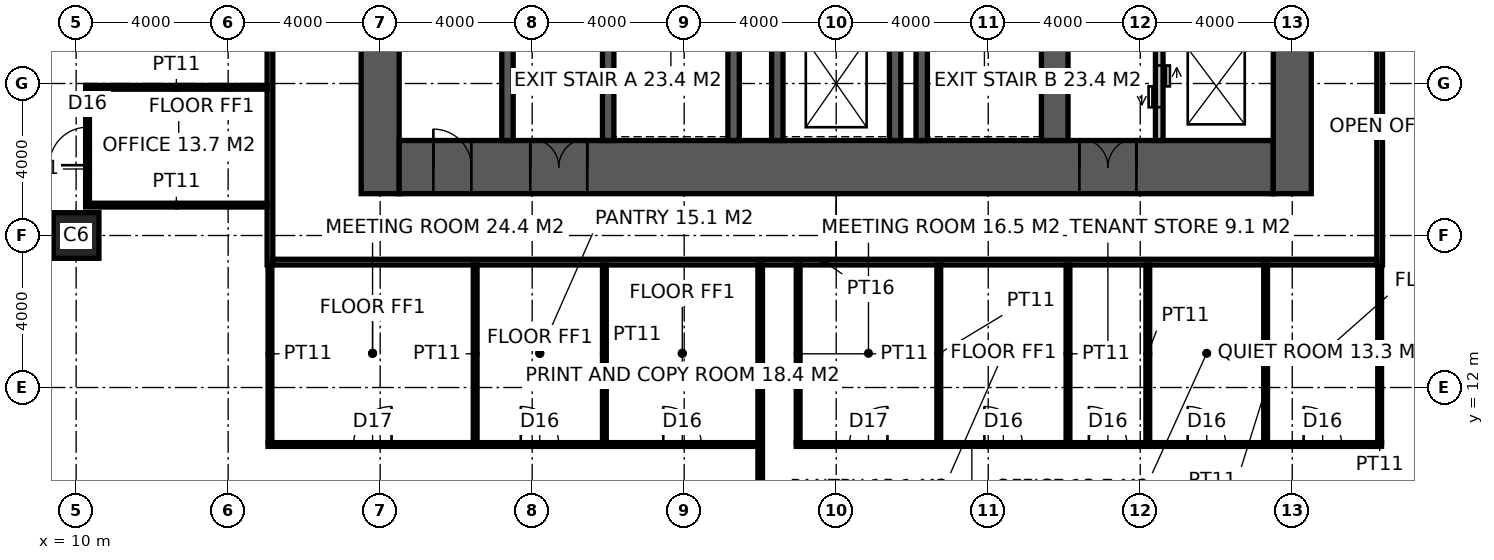
"""IFC4 building model, lengths in metres.
Left out: names, types, materials, properties, quantities, classifications, styles, units other than length and angle.
Written with IfcOpenShell. Run it as: python <this file> out.ifc"""

import sys

from ifc_helpers import new_model, si_unit, direction, frame, frame_2d, origin, origin_2d, place, context, subcontext, project, spatial, rectangle, hollow_rectangle, extrude, element, fill, save


model = new_model("IFC4")
c1 = context("Model", 3, precision=1e-05, world=origin(), true_north=direction((0.0, 1.0)))
c2 = subcontext(c1, "Body", "Model", "MODEL_VIEW")
j1 = project(units=[si_unit("LENGTHUNIT", "METRE"), si_unit("PLANEANGLEUNIT", "RADIAN")], contexts=[c1])
p1 = place(None, origin())
s1 = spatial("IfcSite", under=j1, at=p1, CompositionType="ELEMENT")
p2 = place(p1, origin())
s2 = spatial("IfcBuilding", under=s1, at=p2, CompositionType="ELEMENT")
p3 = place(p2, frame((0.0, 0.0, 6.0)))
s3 = spatial("IfcBuildingStorey", under=s2, at=p3, CompositionType="ELEMENT", Elevation=6.0)
p4 = place(p3, frame((10.0, 16.0, 0.0), z_axis=(0.0, 0.0, 1.0), x_axis=(1.0, 0.0, 0.0)))
e1 = element("IfcColumn", 1, at=p4, inside=s3, PredefinedType="COLUMN", context=c2, shape_type="SweptSolid", body=[
    extrude(hollow_rectangle(XDim=1.2, YDim=1.2, WallThickness=0.125, at=origin_2d()), origin(), (0.0, 0.0, 1.0), 5.0),
])
p5 = place(p3, frame((18.0, 17.1, -0.15), z_axis=(0.0, 0.0, 1.0), x_axis=(0.0, 1.0, 0.0)))
e2 = element("IfcWall", 2, at=p5, inside=s3, PredefinedType="SHEAR", context=c2, shape_type="SweptSolid", body=[
    extrude(rectangle(XDim=19.8, YDim=1.0, at=frame_2d((9.9, 0.0))), origin(), (0.0, 0.0, 1.0), 5.0),
])
p6 = place(p3, frame((18.5, 17.8, -0.15), z_axis=(0.0, 0.0, 1.0), x_axis=(1.0, 0.0, 0.0)))
e3 = element("IfcWall", 3, at=p6, inside=s3, PredefinedType="SHEAR", context=c2, shape_type="SweptSolid", body=[
    extrude(rectangle(XDim=23.0, YDim=1.4, at=frame_2d((11.5, 0.0))), origin(), (0.0, 0.0, 1.0), 5.0),
])
p7 = place(p6, frame((3.45, 0.0, 0.15)))
e4 = element("IfcOpeningElement", 4, at=p7, cuts=e3, PredefinedType="OPENING", context=c2, shape_type="SweptSolid", body=[
    extrude(rectangle(XDim=1.5, YDim=2.4, at=frame_2d((0.75, 1.2))), frame((0.0, 0.71, 0.0), z_axis=(0.0, -1.0, 0.0), x_axis=(1.0, 0.0, 0.0)), (0.0, 0.0, 1.0), 1.42),
])
p8 = place(p6, frame((17.9, 0.0, 0.15)))
e5 = element("IfcOpeningElement", 5, at=p8, cuts=e3, PredefinedType="OPENING", context=c2, shape_type="SweptSolid", body=[
    extrude(rectangle(XDim=1.5, YDim=2.4, at=frame_2d((0.75, 1.2))), frame((0.0, 0.71, 0.0), z_axis=(0.0, -1.0, 0.0), x_axis=(1.0, 0.0, 0.0)), (0.0, 0.0, 1.0), 1.42),
])
p9 = place(p6, frame((0.9, 0.0, 0.15)))
e6 = element("IfcOpeningElement", 6, at=p9, cuts=e3, PredefinedType="OPENING", context=c2, shape_type="SweptSolid", body=[
    extrude(rectangle(XDim=1.0, YDim=2.2, at=frame_2d((0.5, 1.1))), frame((0.0, 0.71, 0.0), z_axis=(0.0, -1.0, 0.0), x_axis=(1.0, 0.0, 0.0)), (0.0, 0.0, 1.0), 1.42),
])
p10 = place(p3, frame((42.0, 17.1, -0.15), z_axis=(0.0, 0.0, 1.0), x_axis=(0.0, 1.0, 0.0)))
e7 = element("IfcWall", 7, at=p10, inside=s3, PredefinedType="SHEAR", context=c2, shape_type="SweptSolid", body=[
    extrude(rectangle(XDim=19.8, YDim=1.0, at=frame_2d((9.9, 0.0))), origin(), (0.0, 0.0, 1.0), 5.0),
])
p11 = place(p3, frame((35.75, 18.5, -0.15), z_axis=(0.0, 0.0, 1.0), x_axis=(0.0, 1.0, 0.0)))
e8 = element("IfcWall", 8, at=p11, inside=s3, PredefinedType="SHEAR", context=c2, shape_type="SweptSolid", body=[
    extrude(rectangle(XDim=17.0, YDim=0.7, at=frame_2d((8.5, 0.0))), origin(), (0.0, 0.0, 1.0), 5.0),
])
p12 = place(p11, frame((9.85, 0.0, 0.15)))
e9 = element("IfcOpeningElement", 9, at=p12, cuts=e8, PredefinedType="OPENING", context=c2, shape_type="SweptSolid", body=[
    extrude(rectangle(XDim=1.0, YDim=2.2, at=frame_2d((0.5, 1.1))), frame((0.0, 0.36, 0.0), z_axis=(0.0, -1.0, 0.0), x_axis=(1.0, 0.0, 0.0)), (0.0, 0.0, 1.0), 0.72),
])
p13 = place(p3, frame((24.0, 18.5, -0.15), z_axis=(0.0, 0.0, 1.0), x_axis=(0.0, 1.0, 0.0)))
e10 = element("IfcWall", 10, at=p13, inside=s3, PredefinedType="SHEAR", context=c2, shape_type="SweptSolid", body=[
    extrude(rectangle(XDim=17.0, YDim=0.3, at=frame_2d((8.5, 0.0))), origin(), (0.0, 0.0, 1.0), 5.0),
])
p14 = place(p13, frame((9.6, 0.0, 0.15)))
e11 = element("IfcOpeningElement", 11, at=p14, cuts=e10, PredefinedType="OPENING", context=c2, shape_type="SweptSolid", body=[
    extrude(rectangle(XDim=1.5, YDim=2.4, at=frame_2d((0.75, 1.2))), frame((0.0, 0.16, 0.0), z_axis=(0.0, -1.0, 0.0), x_axis=(1.0, 0.0, 0.0)), (0.0, 0.0, 1.0), 0.32),
])
p15 = place(p3, frame((27.3, 18.5, -0.15), z_axis=(0.0, 0.0, 1.0), x_axis=(0.0, 1.0, 0.0)))
e12 = element("IfcWall", 12, at=p15, inside=s3, PredefinedType="SHEAR", context=c2, shape_type="SweptSolid", body=[
    extrude(rectangle(XDim=7.9, YDim=0.3, at=frame_2d((3.95, 0.0))), origin(), (0.0, 0.0, 1.0), 5.0),
])
p16 = place(p15, frame((6.4, 0.0, 0.15)))
e13 = element("IfcOpeningElement", 13, at=p16, cuts=e12, PredefinedType="OPENING", context=c2, shape_type="SweptSolid", body=[
    extrude(rectangle(XDim=1.0, YDim=2.2, at=frame_2d((0.5, 1.1))), frame((0.0, 0.16, 0.0), z_axis=(0.0, -1.0, 0.0), x_axis=(1.0, 0.0, 0.0)), (0.0, 0.0, 1.0), 0.32),
])
p17 = place(p3, frame((32.25, 18.5, -0.15), z_axis=(0.0, 0.0, 1.0), x_axis=(0.0, 1.0, 0.0)))
e14 = element("IfcWall", 14, at=p17, inside=s3, PredefinedType="SHEAR", context=c2, shape_type="SweptSolid", body=[
    extrude(rectangle(XDim=7.9, YDim=0.3, at=frame_2d((3.95, 0.0))), origin(), (0.0, 0.0, 1.0), 5.0),
])
for number, where, z_axis, x_axis in (
    (15, (28.45, 18.5, -0.15), (0.0, 0.0, 1.0), (0.0, 1.0, 0.0)),
    (16, (31.55, 18.5, -0.15), (0.0, 0.0, 1.0), (0.0, 1.0, 0.0)),
):
    element("IfcWall", number, at=place(p3, frame(where, z_axis=z_axis, x_axis=x_axis)), inside=s3, PredefinedType="SHEAR", context=c2, shape_type="SweptSolid", body=[
        extrude(rectangle(XDim=2.9, YDim=0.3, at=frame_2d((1.45, 0.0))), origin(), (0.0, 0.0, 1.0), 5.0),
    ])
p18 = place(p3, frame((21.35, 18.5, -0.15), z_axis=(0.0, 0.0, 1.0), x_axis=(0.0, 1.0, 0.0)))
e17 = element("IfcWall", 17, at=p18, inside=s3, PredefinedType="SHEAR", context=c2, shape_type="SweptSolid", body=[
    extrude(rectangle(XDim=12.5, YDim=0.3, at=frame_2d((6.25, 0.0))), origin(), (0.0, 0.0, 1.0), 5.0),
])
p19 = place(p18, frame((9.575, 0.0, 0.15)))
e18 = element("IfcOpeningElement", 18, at=p19, cuts=e17, PredefinedType="OPENING", context=c2, shape_type="SweptSolid", body=[
    extrude(rectangle(XDim=1.0, YDim=2.2, at=frame_2d((0.5, 1.1))), frame((0.0, 0.16, 0.0), z_axis=(0.0, -1.0, 0.0), x_axis=(1.0, 0.0, 0.0)), (0.0, 0.0, 1.0), 0.32),
])
p20 = place(p3, frame((38.5, 18.5, -0.15), z_axis=(0.0, 0.0, 1.0), x_axis=(0.0, 1.0, 0.0)))
e19 = element("IfcWall", 19, at=p20, inside=s3, PredefinedType="SOLIDWALL", context=c2, shape_type="SweptSolid", body=[
    extrude(rectangle(XDim=11.5, YDim=0.2, at=frame_2d((5.75, 0.0))), origin(), (0.0, 0.0, 1.0), 5.0),
])
p21 = place(p20, frame((0.875, 0.0, 0.15)))
e20 = element("IfcOpeningElement", 20, at=p21, cuts=e19, PredefinedType="OPENING", context=c2, shape_type="SweptSolid", body=[
    extrude(rectangle(XDim=1.1, YDim=2.2, at=frame_2d((0.55, 1.1))), frame((0.0, 0.11, 0.0), z_axis=(0.0, -1.0, 0.0), x_axis=(1.0, 0.0, 0.0)), (0.0, 0.0, 1.0), 0.22),
])
p22 = place(p20, frame((3.825, 0.0, 0.15)))
e21 = element("IfcOpeningElement", 21, at=p22, cuts=e19, PredefinedType="OPENING", context=c2, shape_type="SweptSolid", body=[
    extrude(rectangle(XDim=1.1, YDim=2.2, at=frame_2d((0.55, 1.1))), frame((0.0, 0.11, 0.0), z_axis=(0.0, -1.0, 0.0), x_axis=(1.0, 0.0, 0.0)), (0.0, 0.0, 1.0), 0.22),
])
p23 = place(p20, frame((6.675, 0.0, 0.15)))
e22 = element("IfcOpeningElement", 22, at=p23, cuts=e19, PredefinedType="OPENING", context=c2, shape_type="SweptSolid", body=[
    extrude(rectangle(XDim=1.1, YDim=2.2, at=frame_2d((0.55, 1.1))), frame((0.0, 0.11, 0.0), z_axis=(0.0, -1.0, 0.0), x_axis=(1.0, 0.0, 0.0)), (0.0, 0.0, 1.0), 0.22),
])
p24 = place(p20, frame((9.575, 0.0, 0.15)))
e23 = element("IfcOpeningElement", 23, at=p24, cuts=e19, PredefinedType="OPENING", context=c2, shape_type="SweptSolid", body=[
    extrude(rectangle(XDim=1.1, YDim=2.2, at=frame_2d((0.55, 1.1))), frame((0.0, 0.11, 0.0), z_axis=(0.0, -1.0, 0.0), x_axis=(1.0, 0.0, 0.0)), (0.0, 0.0, 1.0), 0.22),
])
p25 = place(p3, frame((15.1, 15.225, 0.0), z_axis=(0.0, 0.0, 1.0), x_axis=(0.0, 1.0, 0.0)))
e24 = element("IfcWall", 24, at=p25, inside=s3, PredefinedType="PARTITIONING", context=c2, shape_type="SweptSolid", body=[
    extrude(rectangle(XDim=23.55, YDim=0.15, at=frame_2d((11.775, 0.0))), origin(), (0.0, 0.0, 1.0), 4.85),
])
p26 = place(p25, frame((10.875, 0.0, 0.0)))
e25 = element("IfcOpeningElement", 25, at=p26, cuts=e24, PredefinedType="OPENING", context=c2, shape_type="SweptSolid", body=[
    extrude(rectangle(XDim=1.8, YDim=2.4, at=frame_2d((0.9, 1.2))), frame((0.0, 0.085, 0.0), z_axis=(0.0, -1.0, 0.0), x_axis=(1.0, 0.0, 0.0)), (0.0, 0.0, 1.0), 0.17),
])
p27 = place(p3, frame((44.3, 15.225, 0.0), z_axis=(0.0, 0.0, 1.0), x_axis=(0.0, 1.0, 0.0)))
e26 = element("IfcWall", 26, at=p27, inside=s3, PredefinedType="PARTITIONING", context=c2, shape_type="SweptSolid", body=[
    extrude(rectangle(XDim=23.55, YDim=0.15, at=frame_2d((11.775, 0.0))), origin(), (0.0, 0.0, 1.0), 4.85),
])
p28 = place(p27, frame((10.175, 0.0, 0.0)))
e27 = element("IfcOpeningElement", 27, at=p28, cuts=e26, PredefinedType="OPENING", context=c2, shape_type="SweptSolid", body=[
    extrude(rectangle(XDim=1.8, YDim=2.4, at=frame_2d((0.9, 1.2))), frame((0.0, 0.085, 0.0), z_axis=(0.0, -1.0, 0.0), x_axis=(1.0, 0.0, 0.0)), (0.0, 0.0, 1.0), 0.17),
])
p29 = place(p3, frame((15.175, 15.3, 0.0), z_axis=(0.0, 0.0, 1.0), x_axis=(1.0, 0.0, 0.0)))
e28 = element("IfcWall", 28, at=p29, inside=s3, PredefinedType="PARTITIONING", context=c2, shape_type="SweptSolid", body=[
    extrude(rectangle(XDim=29.05, YDim=0.15, at=frame_2d((14.525, 0.0))), origin(), (0.0, 0.0, 1.0), 4.85),
])
p30 = place(p3, frame((28.0, -3.7, 0.0), z_axis=(0.0, 0.0, 1.0), x_axis=(0.0, 1.0, 0.0)))
e29 = element("IfcWall", 29, at=p30, inside=s3, PredefinedType="PARTITIONING", context=c2, shape_type="SweptSolid", body=[
    extrude(rectangle(XDim=18.925, YDim=0.12, at=frame_2d((9.462, 0.0))), origin(), (0.0, 0.0, 1.0), 4.85),
])
p31 = place(p3, frame((15.05, 10.5, 0.0), z_axis=(0.0, 0.0, 1.0), x_axis=(1.0, 0.0, 0.0)))
e30 = element("IfcWall", 30, at=p31, inside=s3, PredefinedType="PARTITIONING", context=c2, shape_type="SweptSolid", body=[
    extrude(rectangle(XDim=12.889, YDim=0.1, at=frame_2d((6.444, 0.0))), origin(), (0.0, 0.0, 1.0), 4.85),
])
p32 = place(p31, frame((2.25, 0.0, 0.0)))
e31 = element("IfcOpeningElement", 31, at=p32, cuts=e30, PredefinedType="OPENING", context=c2, shape_type="SweptSolid", body=[
    extrude(rectangle(XDim=1.0, YDim=2.2, at=frame_2d((0.5, 1.1))), frame((0.0, 0.06, 0.0), z_axis=(0.0, -1.0, 0.0), x_axis=(1.0, 0.0, 0.0)), (0.0, 0.0, 1.0), 0.12),
])
p33 = place(p31, frame((6.65, 0.0, 0.0)))
e32 = element("IfcOpeningElement", 32, at=p33, cuts=e30, PredefinedType="OPENING", context=c2, shape_type="SweptSolid", body=[
    extrude(rectangle(XDim=1.0, YDim=2.2, at=frame_2d((0.5, 1.1))), frame((0.0, 0.06, 0.0), z_axis=(0.0, -1.0, 0.0), x_axis=(1.0, 0.0, 0.0)), (0.0, 0.0, 1.0), 0.12),
])
p34 = place(p31, frame((10.399, 0.0, 0.0)))
e33 = element("IfcOpeningElement", 33, at=p34, cuts=e30, PredefinedType="OPENING", context=c2, shape_type="SweptSolid", body=[
    extrude(rectangle(XDim=1.0, YDim=2.2, at=frame_2d((0.5, 1.1))), frame((0.0, 0.06, 0.0), z_axis=(0.0, -1.0, 0.0), x_axis=(1.0, 0.0, 0.0)), (0.0, 0.0, 1.0), 0.12),
])
p35 = place(p3, frame((28.949, 10.5, 0.0), z_axis=(0.0, 0.0, 1.0), x_axis=(1.0, 0.0, 0.0)))
e34 = element("IfcWall", 34, at=p35, inside=s3, PredefinedType="PARTITIONING", context=c2, shape_type="SweptSolid", body=[
    extrude(rectangle(XDim=15.401, YDim=0.1, at=frame_2d((7.701, 0.0))), origin(), (0.0, 0.0, 1.0), 4.85),
])
p36 = place(p35, frame((1.4, 0.0, 0.0)))
e35 = element("IfcOpeningElement", 35, at=p36, cuts=e34, PredefinedType="OPENING", context=c2, shape_type="SweptSolid", body=[
    extrude(rectangle(XDim=1.0, YDim=2.2, at=frame_2d((0.5, 1.1))), frame((0.0, 0.06, 0.0), z_axis=(0.0, -1.0, 0.0), x_axis=(1.0, 0.0, 0.0)), (0.0, 0.0, 1.0), 0.12),
])
p37 = place(p35, frame((4.95, 0.0, 0.0)))
e36 = element("IfcOpeningElement", 36, at=p37, cuts=e34, PredefinedType="OPENING", context=c2, shape_type="SweptSolid", body=[
    extrude(rectangle(XDim=1.0, YDim=2.2, at=frame_2d((0.5, 1.1))), frame((0.0, 0.06, 0.0), z_axis=(0.0, -1.0, 0.0), x_axis=(1.0, 0.0, 0.0)), (0.0, 0.0, 1.0), 0.12),
])
p38 = place(p35, frame((7.7, 0.0, 0.0)))
e37 = element("IfcOpeningElement", 37, at=p38, cuts=e34, PredefinedType="OPENING", context=c2, shape_type="SweptSolid", body=[
    extrude(rectangle(XDim=1.0, YDim=2.2, at=frame_2d((0.5, 1.1))), frame((0.0, 0.06, 0.0), z_axis=(0.0, -1.0, 0.0), x_axis=(1.0, 0.0, 0.0)), (0.0, 0.0, 1.0), 0.12),
])
p39 = place(p35, frame((10.3, 0.0, 0.0)))
e38 = element("IfcOpeningElement", 38, at=p39, cuts=e34, PredefinedType="OPENING", context=c2, shape_type="SweptSolid", body=[
    extrude(rectangle(XDim=1.0, YDim=2.2, at=frame_2d((0.5, 1.1))), frame((0.0, 0.06, 0.0), z_axis=(0.0, -1.0, 0.0), x_axis=(1.0, 0.0, 0.0)), (0.0, 0.0, 1.0), 0.12),
])
p40 = place(p35, frame((13.351, 0.0, 0.0)))
e39 = element("IfcOpeningElement", 39, at=p40, cuts=e34, PredefinedType="OPENING", context=c2, shape_type="SweptSolid", body=[
    extrude(rectangle(XDim=1.0, YDim=2.2, at=frame_2d((0.5, 1.1))), frame((0.0, 0.06, 0.0), z_axis=(0.0, -1.0, 0.0), x_axis=(1.0, 0.0, 0.0)), (0.0, 0.0, 1.0), 0.12),
])
p41 = place(p3, frame((10.25, 16.8, 0.0), z_axis=(0.0, 0.0, 1.0), x_axis=(1.0, 0.0, 0.0)))
e40 = element("IfcWall", 40, at=p41, inside=s3, PredefinedType="PARTITIONING", context=c2, shape_type="SweptSolid", body=[
    extrude(rectangle(XDim=4.775, YDim=0.1, at=frame_2d((2.387, 0.0))), origin(), (0.0, 0.0, 1.0), 4.85),
])
p42 = place(p3, frame((10.25, 19.9, 0.0), z_axis=(0.0, 0.0, 1.0), x_axis=(1.0, 0.0, 0.0)))
e41 = element("IfcWall", 41, at=p42, inside=s3, PredefinedType="PARTITIONING", context=c2, shape_type="SweptSolid", body=[
    extrude(rectangle(XDim=4.775, YDim=0.1, at=frame_2d((2.387, 0.0))), origin(), (0.0, 0.0, 1.0), 3.65),
])
p43 = place(p3, frame((10.3, 16.85, 0.0), z_axis=(0.0, 0.0, 1.0), x_axis=(0.0, 1.0, 0.0)))
e42 = element("IfcWall", 42, at=p43, inside=s3, PredefinedType="PARTITIONING", context=c2, shape_type="SweptSolid", body=[
    extrude(rectangle(XDim=3.0, YDim=0.1, at=frame_2d((1.5, 0.0))), origin(), (0.0, 0.0, 1.0), 3.85),
])
p44 = place(p43, frame((1.0, 0.0, 0.0)))
e43 = element("IfcOpeningElement", 43, at=p44, cuts=e42, PredefinedType="OPENING", context=c2, shape_type="SweptSolid", body=[
    extrude(rectangle(XDim=1.0, YDim=2.2, at=frame_2d((0.5, 1.1))), frame((0.0, 0.06, 0.0), z_axis=(0.0, -1.0, 0.0), x_axis=(1.0, 0.0, 0.0)), (0.0, 0.0, 1.0), 0.12),
])
for number, where, z_axis, x_axis in (
    (44, (15.1, 10.55, 0.0), (0.0, 0.0, 1.0), (0.0, 1.0, 0.0)),
    (45, (20.5, 10.55, 0.0), (0.0, 0.0, 1.0), (0.0, 1.0, 0.0)),
    (46, (23.9, 10.55, 0.0), (0.0, 0.0, 1.0), (0.0, 1.0, 0.0)),
    (47, (28.999, 10.55, 0.0), (0.0, 0.0, 1.0), (0.0, 1.0, 0.0)),
    (48, (32.699, 10.55, 0.0), (0.0, 0.0, 1.0), (0.0, 1.0, 0.0)),
    (49, (36.099, 10.55, 0.0), (0.0, 0.0, 1.0), (0.0, 1.0, 0.0)),
    (50, (38.199, 10.55, 0.0), (0.0, 0.0, 1.0), (0.0, 1.0, 0.0)),
    (51, (41.299, 10.55, 0.0), (0.0, 0.0, 1.0), (0.0, 1.0, 0.0)),
    (52, (44.3, 10.55, 0.0), (0.0, 0.0, 1.0), (0.0, 1.0, 0.0)),
):
    element("IfcWall", number, at=place(p3, frame(where, z_axis=z_axis, x_axis=x_axis)), inside=s3, PredefinedType="PARTITIONING", context=c2, shape_type="SweptSolid", body=[
        extrude(rectangle(XDim=4.675, YDim=0.1, at=frame_2d((2.337, 0.0))), origin(), (0.0, 0.0, 1.0), 4.85),
    ])
p45 = place(p7, origin())
e53 = element("IfcDoor", 53, at=p45, inside=s3, OperationType="DOUBLE_DOOR_DOUBLE_SWING", PredefinedType="DOOR", context=c2, shape_type="SweptSolid", body=[
    extrude(rectangle(XDim=1.5, YDim=2.4, at=frame_2d((0.75, 1.2))), frame((0.0, 0.025, 0.0), z_axis=(0.0, -1.0, 0.0), x_axis=(1.0, 0.0, 0.0)), (0.0, 0.0, 1.0), 0.05),
])
fill(e4, e53)
p46 = place(p8, origin())
e54 = element("IfcDoor", 54, at=p46, inside=s3, OperationType="DOUBLE_DOOR_DOUBLE_SWING", PredefinedType="DOOR", context=c2, shape_type="SweptSolid", body=[
    extrude(rectangle(XDim=1.5, YDim=2.4, at=frame_2d((0.75, 1.2))), frame((0.0, 0.025, 0.0), z_axis=(0.0, -1.0, 0.0), x_axis=(1.0, 0.0, 0.0)), (0.0, 0.0, 1.0), 0.05),
])
fill(e5, e54)
p47 = place(p9, origin())
e55 = element("IfcDoor", 55, at=p47, inside=s3, OperationType="SINGLE_SWING_LEFT", PredefinedType="DOOR", context=c2, shape_type="SweptSolid", body=[
    extrude(rectangle(XDim=1.0, YDim=2.2, at=frame_2d((0.5, 1.1))), frame((0.0, 0.025, 0.0), z_axis=(0.0, -1.0, 0.0), x_axis=(1.0, 0.0, 0.0)), (0.0, 0.0, 1.0), 0.05),
])
fill(e6, e55)
p48 = place(p32, origin())
e56 = element("IfcDoor", 56, at=p48, inside=s3, OperationType="SINGLE_SWING_RIGHT", PredefinedType="DOOR", context=c2, shape_type="SweptSolid", body=[
    extrude(rectangle(XDim=1.0, YDim=2.2, at=frame_2d((0.5, 1.1))), frame((0.0, 0.025, 0.0), z_axis=(0.0, -1.0, 0.0), x_axis=(1.0, 0.0, 0.0)), (0.0, 0.0, 1.0), 0.05),
])
fill(e31, e56)
p49 = place(p33, origin())
e57 = element("IfcDoor", 57, at=p49, inside=s3, OperationType="SINGLE_SWING_LEFT", PredefinedType="DOOR", context=c2, shape_type="SweptSolid", body=[
    extrude(rectangle(XDim=1.0, YDim=2.2, at=frame_2d((0.5, 1.1))), frame((0.0, 0.025, 0.0), z_axis=(0.0, -1.0, 0.0), x_axis=(1.0, 0.0, 0.0)), (0.0, 0.0, 1.0), 0.05),
])
fill(e32, e57)
p50 = place(p34, origin())
e58 = element("IfcDoor", 58, at=p50, inside=s3, OperationType="SINGLE_SWING_LEFT", PredefinedType="DOOR", context=c2, shape_type="SweptSolid", body=[
    extrude(rectangle(XDim=1.0, YDim=2.2, at=frame_2d((0.5, 1.1))), frame((0.0, 0.025, 0.0), z_axis=(0.0, -1.0, 0.0), x_axis=(1.0, 0.0, 0.0)), (0.0, 0.0, 1.0), 0.05),
])
fill(e33, e58)
p51 = place(p36, origin())
e59 = element("IfcDoor", 59, at=p51, inside=s3, OperationType="SINGLE_SWING_RIGHT", PredefinedType="DOOR", context=c2, shape_type="SweptSolid", body=[
    extrude(rectangle(XDim=1.0, YDim=2.2, at=frame_2d((0.5, 1.1))), frame((0.0, 0.025, 0.0), z_axis=(0.0, -1.0, 0.0), x_axis=(1.0, 0.0, 0.0)), (0.0, 0.0, 1.0), 0.05),
])
fill(e35, e59)
p52 = place(p37, origin())
e60 = element("IfcDoor", 60, at=p52, inside=s3, OperationType="SINGLE_SWING_LEFT", PredefinedType="DOOR", context=c2, shape_type="SweptSolid", body=[
    extrude(rectangle(XDim=1.0, YDim=2.2, at=frame_2d((0.5, 1.1))), frame((0.0, 0.025, 0.0), z_axis=(0.0, -1.0, 0.0), x_axis=(1.0, 0.0, 0.0)), (0.0, 0.0, 1.0), 0.05),
])
fill(e36, e60)
p53 = place(p38, origin())
e61 = element("IfcDoor", 61, at=p53, inside=s3, OperationType="SINGLE_SWING_LEFT", PredefinedType="DOOR", context=c2, shape_type="SweptSolid", body=[
    extrude(rectangle(XDim=1.0, YDim=2.2, at=frame_2d((0.5, 1.1))), frame((0.0, 0.025, 0.0), z_axis=(0.0, -1.0, 0.0), x_axis=(1.0, 0.0, 0.0)), (0.0, 0.0, 1.0), 0.05),
])
fill(e37, e61)
p54 = place(p39, origin())
e62 = element("IfcDoor", 62, at=p54, inside=s3, OperationType="SINGLE_SWING_LEFT", PredefinedType="DOOR", context=c2, shape_type="SweptSolid", body=[
    extrude(rectangle(XDim=1.0, YDim=2.2, at=frame_2d((0.5, 1.1))), frame((0.0, 0.025, 0.0), z_axis=(0.0, -1.0, 0.0), x_axis=(1.0, 0.0, 0.0)), (0.0, 0.0, 1.0), 0.05),
])
fill(e38, e62)
p55 = place(p40, origin())
e63 = element("IfcDoor", 63, at=p55, inside=s3, OperationType="SINGLE_SWING_LEFT", PredefinedType="DOOR", context=c2, shape_type="SweptSolid", body=[
    extrude(rectangle(XDim=1.0, YDim=2.2, at=frame_2d((0.5, 1.1))), frame((0.0, 0.025, 0.0), z_axis=(0.0, -1.0, 0.0), x_axis=(1.0, 0.0, 0.0)), (0.0, 0.0, 1.0), 0.05),
])
fill(e39, e63)
p56 = place(p44, origin())
e64 = element("IfcDoor", 64, at=p56, inside=s3, OperationType="SINGLE_SWING_LEFT", PredefinedType="DOOR", context=c2, shape_type="SweptSolid", body=[
    extrude(rectangle(XDim=1.0, YDim=2.2, at=frame_2d((0.5, 1.1))), frame((0.0, 0.025, 0.0), z_axis=(0.0, -1.0, 0.0), x_axis=(1.0, 0.0, 0.0)), (0.0, 0.0, 1.0), 0.05),
])
fill(e43, e64)
p57 = place(p21, origin())
e65 = element("IfcDoor", 65, at=p57, inside=s3, OperationType="DOUBLE_DOOR_SLIDING", PredefinedType="DOOR", context=c2, shape_type="SweptSolid", body=[
    extrude(rectangle(XDim=1.1, YDim=2.2, at=frame_2d((0.55, 1.1))), frame((0.0, 0.025, 0.0), z_axis=(0.0, -1.0, 0.0), x_axis=(1.0, 0.0, 0.0)), (0.0, 0.0, 1.0), 0.05),
])
fill(e20, e65)
save(model, sys.argv[1])
